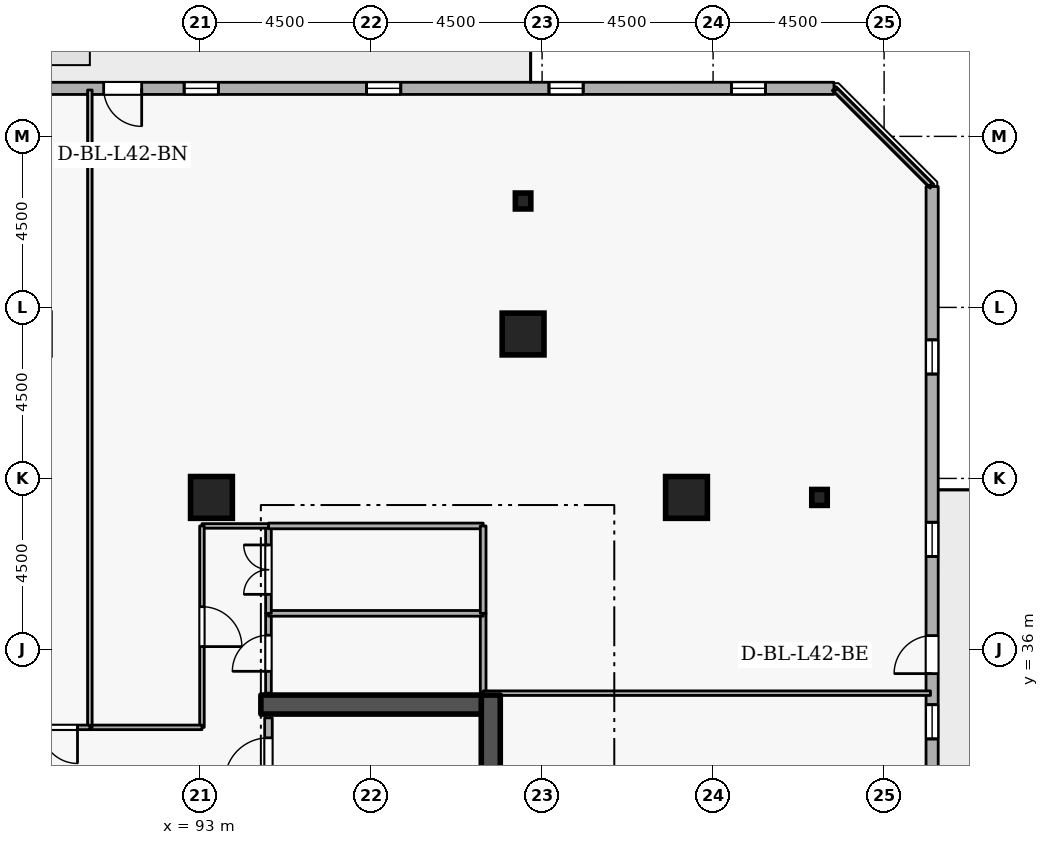
"""IFC4 building model, lengths in metres.
Left out: names, types, materials, properties, quantities, classifications, styles, units other than length and angle.
Written with IfcOpenShell. Run it as: python <this file> out.ifc"""

import sys

from ifc_helpers import new_model, si_unit, direction, frame, frame_2d, origin, origin_2d, place, context, subcontext, project, spatial, rectangle, i_section, extrude, element, fill, save


model = new_model("IFC4")
c1 = context("Model", 3, precision=1e-05, world=origin(), true_north=direction((0.0, 1.0)))
c2 = subcontext(c1, "Body", "Model", "MODEL_VIEW")
j1 = project(units=[si_unit("LENGTHUNIT", "METRE"), si_unit("PLANEANGLEUNIT", "RADIAN")], contexts=[c1])
p1 = place(None, origin())
s1 = spatial("IfcSite", under=j1, at=p1, CompositionType="ELEMENT")
p2 = place(p1, origin())
s2 = spatial("IfcBuilding", under=s1, at=p2, CompositionType="ELEMENT")
p3 = place(p2, frame((0.0, 0.0, 159.9)))
s3 = spatial("IfcBuildingStorey", under=s2, at=p3, CompositionType="ELEMENT", Elevation=159.9)
p4 = place(p3, frame((100.65, 19.2, 0.0), z_axis=(0.0, 0.0, 1.0), x_axis=(0.0, 1.0, 0.0)))
e1 = element("IfcWall", 1, at=p4, inside=s3, PredefinedType="SHEAR", context=c2, shape_type="SweptSolid", body=[
    extrude(rectangle(XDim=15.6, YDim=0.5, at=frame_2d((7.8, 0.0))), origin(), (0.0, 0.0, 1.0), 3.6),
])
p5 = place(p3, frame((94.6, 34.55, 0.0), z_axis=(0.0, 0.0, 1.0), x_axis=(1.0, 0.0, 0.0)))
e2 = element("IfcWall", 2, at=p5, inside=s3, PredefinedType="SHEAR", context=c2, shape_type="SweptSolid", body=[
    extrude(rectangle(XDim=5.8, YDim=0.5, at=frame_2d((2.9, 0.0))), origin(), (0.0, 0.0, 1.0), 3.6),
])
for number, where, z_axis, x_axis in (
    (3, (105.8, 40.0, 0.0), (0.0, 0.0, 1.0), (1.0, 0.0, 0.0)),
    (4, (101.5, 44.3, 0.0), (0.0, 0.0, 1.0), (1.0, 0.0, 0.0)),
    (5, (93.3, 40.0, 0.0), (0.0, 0.0, 1.0), (1.0, 0.0, 0.0)),
):
    element("IfcColumn", number, at=place(p3, frame(where, z_axis=z_axis, x_axis=x_axis)), inside=s3, PredefinedType="COLUMN", context=c2, shape_type="SweptSolid", body=[
        extrude(rectangle(XDim=1.1, YDim=1.1, at=origin_2d()), origin(), (0.0, 0.0, 1.0), 3.6),
    ])
for number, where, z_axis, x_axis in (
    (6, (109.3, 40.0, 0.0), (0.0, 0.0, 1.0), (1.0, 0.0, 0.0)),
    (7, (101.5, 47.8, 0.0), (0.0, 0.0, 1.0), (1.0, 0.0, 0.0)),
):
    element("IfcColumn", number, at=place(p3, frame(where, z_axis=z_axis, x_axis=x_axis)), inside=s3, PredefinedType="COLUMN", context=c2, shape_type="SweptSolid", body=[
        extrude(i_section(OverallWidth=0.407, OverallDepth=0.419, WebThickness=0.031, FlangeThickness=0.049, FilletRadius=0.015, at=origin_2d()), origin(), (0.0, 0.0, 1.0), 3.6),
    ])
p6 = place(p3, frame((112.262, 12.646, 0.0), z_axis=(0.0, 0.0, 1.0), x_axis=(7.5574884e-05, 0.999999997144, 0.0)))
e8 = element("IfcWall", 8, at=p6, inside=s3, PredefinedType="STANDARD", context=c2, shape_type="SweptSolid", body=[
    extrude(rectangle(XDim=35.535, YDim=0.32, at=frame_2d((17.768, 0.0))), origin(), (0.0, 0.0, 1.0), 2.7),
])
p7 = place(p6, frame((22.718, 0.0, 0.0)))
e9 = element("IfcOpeningElement", 9, at=p7, cuts=e8, PredefinedType="OPENING", context=c2, shape_type="SweptSolid", body=[
    extrude(rectangle(XDim=1.0, YDim=2.08, at=frame_2d((0.5, 1.04))), frame((0.0, 0.17, 0.0), z_axis=(0.0, -1.0, 0.0), x_axis=(1.0, 0.0, 0.0)), (0.0, 0.0, 1.0), 0.34),
])
p8 = place(p6, frame((1.8, 0.0, 0.72)))
e10 = element("IfcOpeningElement", 10, at=p8, cuts=e8, PredefinedType="OPENING", context=c2, shape_type="SweptSolid", body=[
    extrude(rectangle(XDim=0.9, YDim=1.75, at=frame_2d((0.45, 0.875))), frame((0.0, 0.17, 0.0), z_axis=(0.0, -1.0, 0.0), x_axis=(1.0, 0.0, 0.0)), (0.0, 0.0, 1.0), 0.34),
])
p9 = place(p6, frame((6.6, 0.0, 0.72)))
e11 = element("IfcOpeningElement", 11, at=p9, cuts=e8, PredefinedType="OPENING", context=c2, shape_type="SweptSolid", body=[
    extrude(rectangle(XDim=0.9, YDim=1.75, at=frame_2d((0.45, 0.875))), frame((0.0, 0.17, 0.0), z_axis=(0.0, -1.0, 0.0), x_axis=(1.0, 0.0, 0.0)), (0.0, 0.0, 1.0), 0.34),
])
p10 = place(p6, frame((11.4, 0.0, 0.72)))
e12 = element("IfcOpeningElement", 12, at=p10, cuts=e8, PredefinedType="OPENING", context=c2, shape_type="SweptSolid", body=[
    extrude(rectangle(XDim=0.9, YDim=1.75, at=frame_2d((0.45, 0.875))), frame((0.0, 0.17, 0.0), z_axis=(0.0, -1.0, 0.0), x_axis=(1.0, 0.0, 0.0)), (0.0, 0.0, 1.0), 0.34),
])
p11 = place(p6, frame((16.2, 0.0, 0.72)))
e13 = element("IfcOpeningElement", 13, at=p11, cuts=e8, PredefinedType="OPENING", context=c2, shape_type="SweptSolid", body=[
    extrude(rectangle(XDim=0.9, YDim=1.75, at=frame_2d((0.45, 0.875))), frame((0.0, 0.17, 0.0), z_axis=(0.0, -1.0, 0.0), x_axis=(1.0, 0.0, 0.0)), (0.0, 0.0, 1.0), 0.34),
])
p12 = place(p6, frame((21.0, 0.0, 0.72)))
e14 = element("IfcOpeningElement", 14, at=p12, cuts=e8, PredefinedType="OPENING", context=c2, shape_type="SweptSolid", body=[
    extrude(rectangle(XDim=0.9, YDim=1.75, at=frame_2d((0.45, 0.875))), frame((0.0, 0.17, 0.0), z_axis=(0.0, -1.0, 0.0), x_axis=(1.0, 0.0, 0.0)), (0.0, 0.0, 1.0), 0.34),
])
p13 = place(p6, frame((25.8, 0.0, 0.72)))
e15 = element("IfcOpeningElement", 15, at=p13, cuts=e8, PredefinedType="OPENING", context=c2, shape_type="SweptSolid", body=[
    extrude(rectangle(XDim=0.9, YDim=1.75, at=frame_2d((0.45, 0.875))), frame((0.0, 0.17, 0.0), z_axis=(0.0, -1.0, 0.0), x_axis=(1.0, 0.0, 0.0)), (0.0, 0.0, 1.0), 0.34),
])
p14 = place(p6, frame((30.6, 0.0, 0.72)))
e16 = element("IfcOpeningElement", 16, at=p14, cuts=e8, PredefinedType="OPENING", context=c2, shape_type="SweptSolid", body=[
    extrude(rectangle(XDim=0.9, YDim=1.75, at=frame_2d((0.45, 0.875))), frame((0.0, 0.17, 0.0), z_axis=(0.0, -1.0, 0.0), x_axis=(1.0, 0.0, 0.0)), (0.0, 0.0, 1.0), 0.34),
])
p15 = place(p3, frame((109.681, 50.765, 0.0), z_axis=(0.0, 0.0, 1.0), x_axis=(-0.999999997144, -7.5574884e-05, 0.0)))
e17 = element("IfcWall", 17, at=p15, inside=s3, PredefinedType="STANDARD", context=c2, shape_type="SweptSolid", body=[
    extrude(rectangle(XDim=35.535, YDim=0.32, at=frame_2d((17.768, 0.0))), origin(), (0.0, 0.0, 1.0), 2.7),
])
p16 = place(p15, frame((18.218, 0.0, 0.0)))
e18 = element("IfcOpeningElement", 18, at=p16, cuts=e17, PredefinedType="OPENING", context=c2, shape_type="SweptSolid", body=[
    extrude(rectangle(XDim=1.0, YDim=2.08, at=frame_2d((0.5, 1.04))), frame((0.0, 0.17, 0.0), z_axis=(0.0, -1.0, 0.0), x_axis=(1.0, 0.0, 0.0)), (0.0, 0.0, 1.0), 0.34),
])
p17 = place(p15, frame((1.8, 0.0, 0.72)))
e19 = element("IfcOpeningElement", 19, at=p17, cuts=e17, PredefinedType="OPENING", context=c2, shape_type="SweptSolid", body=[
    extrude(rectangle(XDim=0.9, YDim=1.75, at=frame_2d((0.45, 0.875))), frame((0.0, 0.17, 0.0), z_axis=(0.0, -1.0, 0.0), x_axis=(1.0, 0.0, 0.0)), (0.0, 0.0, 1.0), 0.34),
])
p18 = place(p15, frame((6.6, 0.0, 0.72)))
e20 = element("IfcOpeningElement", 20, at=p18, cuts=e17, PredefinedType="OPENING", context=c2, shape_type="SweptSolid", body=[
    extrude(rectangle(XDim=0.9, YDim=1.75, at=frame_2d((0.45, 0.875))), frame((0.0, 0.17, 0.0), z_axis=(0.0, -1.0, 0.0), x_axis=(1.0, 0.0, 0.0)), (0.0, 0.0, 1.0), 0.34),
])
p19 = place(p15, frame((11.4, 0.0, 0.72)))
e21 = element("IfcOpeningElement", 21, at=p19, cuts=e17, PredefinedType="OPENING", context=c2, shape_type="SweptSolid", body=[
    extrude(rectangle(XDim=0.9, YDim=1.75, at=frame_2d((0.45, 0.875))), frame((0.0, 0.17, 0.0), z_axis=(0.0, -1.0, 0.0), x_axis=(1.0, 0.0, 0.0)), (0.0, 0.0, 1.0), 0.34),
])
p20 = place(p15, frame((16.2, 0.0, 0.72)))
e22 = element("IfcOpeningElement", 22, at=p20, cuts=e17, PredefinedType="OPENING", context=c2, shape_type="SweptSolid", body=[
    extrude(rectangle(XDim=0.9, YDim=1.75, at=frame_2d((0.45, 0.875))), frame((0.0, 0.17, 0.0), z_axis=(0.0, -1.0, 0.0), x_axis=(1.0, 0.0, 0.0)), (0.0, 0.0, 1.0), 0.34),
])
p21 = place(p15, frame((25.8, 0.0, 0.72)))
e23 = element("IfcOpeningElement", 23, at=p21, cuts=e17, PredefinedType="OPENING", context=c2, shape_type="SweptSolid", body=[
    extrude(rectangle(XDim=0.9, YDim=1.75, at=frame_2d((0.45, 0.875))), frame((0.0, 0.17, 0.0), z_axis=(0.0, -1.0, 0.0), x_axis=(1.0, 0.0, 0.0)), (0.0, 0.0, 1.0), 0.34),
])
p22 = place(p15, frame((30.6, 0.0, 0.72)))
e24 = element("IfcOpeningElement", 24, at=p22, cuts=e17, PredefinedType="OPENING", context=c2, shape_type="SweptSolid", body=[
    extrude(rectangle(XDim=0.9, YDim=1.75, at=frame_2d((0.45, 0.875))), frame((0.0, 0.17, 0.0), z_axis=(0.0, -1.0, 0.0), x_axis=(1.0, 0.0, 0.0)), (0.0, 0.0, 1.0), 0.34),
])
p23 = place(p3, frame((94.8, 32.0, 0.0), z_axis=(0.0, 0.0, 1.0), x_axis=(0.0, 1.0, 0.0)))
e25 = element("IfcWall", 25, at=p23, inside=s3, PredefinedType="STANDARD", context=c2, shape_type="SweptSolid", body=[
    extrude(rectangle(XDim=2.2, YDim=0.2, at=frame_2d((1.1, 0.0))), origin(), (0.0, 0.0, 1.0), 3.34),
])
p24 = place(p23, frame((0.525, 0.0, 0.0)))
e26 = element("IfcOpeningElement", 26, at=p24, cuts=e25, PredefinedType="OPENING", context=c2, shape_type="SweptSolid", body=[
    extrude(rectangle(XDim=1.15, YDim=2.1, at=frame_2d((0.575, 1.05))), frame((0.0, 0.11, 0.0), z_axis=(0.0, -1.0, 0.0), x_axis=(1.0, 0.0, 0.0)), (0.0, 0.0, 1.0), 0.22),
])
p25 = place(p3, frame((100.45, 36.95, 0.0), z_axis=(0.0, 0.0, 1.0), x_axis=(0.0, -1.0, 0.0)))
e27 = element("IfcWall", 27, at=p25, inside=s3, PredefinedType="PARTITIONING", context=c2, shape_type="SweptSolid", body=[
    extrude(rectangle(XDim=2.1, YDim=0.15, at=frame_2d((1.05, 0.0))), origin(), (0.0, 0.0, 1.0), 3.34),
])
p26 = place(p3, frame((94.8, 34.85, 0.0), z_axis=(0.0, 0.0, 1.0), x_axis=(0.0, 1.0, 0.0)))
e28 = element("IfcWall", 28, at=p26, inside=s3, PredefinedType="PARTITIONING", context=c2, shape_type="SweptSolid", body=[
    extrude(rectangle(XDim=2.1, YDim=0.15, at=frame_2d((1.05, 0.0))), origin(), (0.0, 0.0, 1.0), 3.34),
])
p27 = place(p26, frame((0.575, 0.0, 0.0)))
e29 = element("IfcOpeningElement", 29, at=p27, cuts=e28, PredefinedType="OPENING", context=c2, shape_type="SweptSolid", body=[
    extrude(rectangle(XDim=0.95, YDim=2.1, at=frame_2d((0.475, 1.05))), frame((0.0, 0.085, 0.0), z_axis=(0.0, -1.0, 0.0), x_axis=(1.0, 0.0, 0.0)), (0.0, 0.0, 1.0), 0.17),
])
p28 = place(p3, frame((94.8, 36.95, 0.0), z_axis=(0.0, 0.0, 1.0), x_axis=(1.0, 0.0, 0.0)))
e30 = element("IfcWall", 30, at=p28, inside=s3, PredefinedType="PARTITIONING", context=c2, shape_type="SweptSolid", body=[
    extrude(rectangle(XDim=5.65, YDim=0.15, at=frame_2d((2.825, 0.0))), origin(), (0.0, 0.0, 1.0), 3.34),
])
p29 = place(p3, frame((94.8, 36.95, 0.0), z_axis=(0.0, 0.0, 1.0), x_axis=(0.0, 1.0, 0.0)))
e31 = element("IfcWall", 31, at=p29, inside=s3, PredefinedType="PARTITIONING", context=c2, shape_type="SweptSolid", body=[
    extrude(rectangle(XDim=2.3, YDim=0.15, at=frame_2d((1.15, 0.0))), origin(), (0.0, 0.0, 1.0), 3.34),
])
p30 = place(p29, frame((0.5, 0.0, 0.0)))
e32 = element("IfcOpeningElement", 32, at=p30, cuts=e31, PredefinedType="OPENING", context=c2, shape_type="SweptSolid", body=[
    extrude(rectangle(XDim=1.3, YDim=2.12, at=frame_2d((0.65, 1.06))), frame((0.0, 0.085, 0.0), z_axis=(0.0, -1.0, 0.0), x_axis=(1.0, 0.0, 0.0)), (0.0, 0.0, 1.0), 0.17),
])
p31 = place(p3, frame((94.8, 39.25, 0.0), z_axis=(0.0, 0.0, 1.0), x_axis=(1.0, 0.0, 0.0)))
e33 = element("IfcWall", 33, at=p31, inside=s3, PredefinedType="PARTITIONING", context=c2, shape_type="SweptSolid", body=[
    extrude(rectangle(XDim=5.65, YDim=0.15, at=frame_2d((2.825, 0.0))), origin(), (0.0, 0.0, 1.0), 3.34),
])
p32 = place(p3, frame((100.45, 39.25, 0.0), z_axis=(0.0, 0.0, 1.0), x_axis=(0.0, -1.0, 0.0)))
e34 = element("IfcWall", 34, at=p32, inside=s3, PredefinedType="PARTITIONING", context=c2, shape_type="SweptSolid", body=[
    extrude(rectangle(XDim=2.3, YDim=0.15, at=frame_2d((1.15, 0.0))), origin(), (0.0, 0.0, 1.0), 3.34),
])
p33 = place(p3, frame((94.8, 39.25, 0.0), z_axis=(0.0, 0.0, 1.0), x_axis=(-1.0, 0.0, 0.0)))
e35 = element("IfcWall", 35, at=p33, inside=s3, PredefinedType="PARTITIONING", context=c2, shape_type="SweptSolid", body=[
    extrude(rectangle(XDim=1.75, YDim=0.12, at=frame_2d((0.875, 0.0))), origin(), (0.0, 0.0, 1.0), 3.34),
])
p34 = place(p3, frame((93.05, 39.25, 0.0), z_axis=(0.0, 0.0, 1.0), x_axis=(0.0, -1.0, 0.0)))
e36 = element("IfcWall", 36, at=p34, inside=s3, PredefinedType="PARTITIONING", context=c2, shape_type="SweptSolid", body=[
    extrude(rectangle(XDim=5.3, YDim=0.12, at=frame_2d((2.65, 0.0))), origin(), (0.0, 0.0, 1.0), 3.34),
])
p35 = place(p34, frame((2.125, 0.0, 0.0)))
e37 = element("IfcOpeningElement", 37, at=p35, cuts=e36, PredefinedType="OPENING", context=c2, shape_type="SweptSolid", body=[
    extrude(rectangle(XDim=1.05, YDim=2.1, at=frame_2d((0.525, 1.05))), frame((0.0, 0.07, 0.0), z_axis=(0.0, -1.0, 0.0), x_axis=(1.0, 0.0, 0.0)), (0.0, 0.0, 1.0), 0.14),
])
p36 = place(p3, frame((93.05, 33.95, 0.0), z_axis=(0.0, 0.0, 1.0), x_axis=(-1.0, 0.0, 0.0)))
e38 = element("IfcWall", 38, at=p36, inside=s3, PredefinedType="PARTITIONING", context=c2, shape_type="SweptSolid", body=[
    extrude(rectangle(XDim=2.95, YDim=0.12, at=frame_2d((1.475, 0.0))), origin(), (0.0, 0.0, 1.0), 3.34),
])
p37 = place(p3, frame((90.1, 33.95, 0.0), z_axis=(0.0, 0.0, 1.0), x_axis=(0.0, 1.0, 0.0)))
e39 = element("IfcWall", 39, at=p37, inside=s3, PredefinedType="PARTITIONING", context=c2, shape_type="SweptSolid", body=[
    extrude(rectangle(XDim=16.77, YDim=0.12, at=frame_2d((8.385, 0.0))), origin(), (0.0, 0.0, 1.0), 3.34),
])
p38 = place(p3, frame((109.725, 50.72, 0.0), z_axis=(0.0, 0.0, 1.0), x_axis=(0.707106781187, -0.707106781187, 0.0)))
e40 = element("IfcWall", 40, at=p38, inside=s3, PredefinedType="PARTITIONING", context=c2, shape_type="SweptSolid", body=[
    extrude(rectangle(XDim=3.528, YDim=0.12, at=frame_2d((1.764, 0.0))), origin(), (0.0, 0.0, 1.0), 3.34),
])
p39 = place(p3, frame((112.22, 34.85, 0.0), z_axis=(0.0, 0.0, 1.0), x_axis=(-1.0, 0.0, 0.0)))
e41 = element("IfcWall", 41, at=p39, inside=s3, PredefinedType="PARTITIONING", context=c2, shape_type="SweptSolid", body=[
    extrude(rectangle(XDim=11.77, YDim=0.12, at=frame_2d((5.885, 0.0))), origin(), (0.0, 0.0, 1.0), 2.545),
])
p40 = place(p3, frame((90.1, 33.95, 0.0), z_axis=(0.0, 0.0, 1.0), x_axis=(-1.0, 0.0, 0.0)))
e42 = element("IfcWall", 42, at=p40, inside=s3, PredefinedType="PARTITIONING", context=c2, shape_type="SweptSolid", body=[
    extrude(rectangle(XDim=1.6, YDim=0.12, at=frame_2d((0.8, 0.0))), origin(), (0.0, 0.0, 1.0), 3.34),
])
p41 = place(p40, frame((0.325, 0.0, 0.0)))
e43 = element("IfcOpeningElement", 43, at=p41, cuts=e42, PredefinedType="OPENING", context=c2, shape_type="SweptSolid", body=[
    extrude(rectangle(XDim=0.95, YDim=2.1, at=frame_2d((0.475, 1.05))), frame((0.0, 0.07, 0.0), z_axis=(0.0, -1.0, 0.0), x_axis=(1.0, 0.0, 0.0)), (0.0, 0.0, 1.0), 0.14),
])
p42 = place(p7, origin())
e44 = element("IfcDoor", 44, at=p42, inside=s3, OperationType="SINGLE_SWING_LEFT", PredefinedType="DOOR", context=c2, shape_type="SweptSolid", body=[
    extrude(rectangle(XDim=1.0, YDim=2.08, at=frame_2d((0.5, 1.04))), frame((0.0, 0.025, 0.0), z_axis=(0.0, -1.0, 0.0), x_axis=(1.0, 0.0, 0.0)), (0.0, 0.0, 1.0), 0.05),
])
fill(e9, e44)
p43 = place(p12, origin())
e45 = element("IfcWindow", 45, at=p43, inside=s3, PartitioningType="SINGLE_PANEL", PredefinedType="WINDOW", context=c2, shape_type="SweptSolid", body=[
    extrude(rectangle(XDim=0.9, YDim=1.75, at=frame_2d((0.45, 0.875))), frame((0.0, 0.03, 0.0), z_axis=(0.0, -1.0, 0.0), x_axis=(1.0, 0.0, 0.0)), (0.0, 0.0, 1.0), 0.06),
])
fill(e14, e45)
p44 = place(p13, origin())
e46 = element("IfcWindow", 46, at=p44, inside=s3, PartitioningType="SINGLE_PANEL", PredefinedType="WINDOW", context=c2, shape_type="SweptSolid", body=[
    extrude(rectangle(XDim=0.9, YDim=1.75, at=frame_2d((0.45, 0.875))), frame((0.0, 0.03, 0.0), z_axis=(0.0, -1.0, 0.0), x_axis=(1.0, 0.0, 0.0)), (0.0, 0.0, 1.0), 0.06),
])
fill(e15, e46)
p45 = place(p14, origin())
e47 = element("IfcWindow", 47, at=p45, inside=s3, PartitioningType="SINGLE_PANEL", PredefinedType="WINDOW", context=c2, shape_type="SweptSolid", body=[
    extrude(rectangle(XDim=0.9, YDim=1.75, at=frame_2d((0.45, 0.875))), frame((0.0, 0.03, 0.0), z_axis=(0.0, -1.0, 0.0), x_axis=(1.0, 0.0, 0.0)), (0.0, 0.0, 1.0), 0.06),
])
fill(e16, e47)
p46 = place(p16, origin())
e48 = element("IfcDoor", 48, at=p46, inside=s3, OperationType="SINGLE_SWING_LEFT", PredefinedType="DOOR", context=c2, shape_type="SweptSolid", body=[
    extrude(rectangle(XDim=1.0, YDim=2.08, at=frame_2d((0.5, 1.04))), frame((0.0, 0.025, 0.0), z_axis=(0.0, -1.0, 0.0), x_axis=(1.0, 0.0, 0.0)), (0.0, 0.0, 1.0), 0.05),
])
fill(e18, e48)
p47 = place(p17, origin())
e49 = element("IfcWindow", 49, at=p47, inside=s3, PartitioningType="SINGLE_PANEL", PredefinedType="WINDOW", context=c2, shape_type="SweptSolid", body=[
    extrude(rectangle(XDim=0.9, YDim=1.75, at=frame_2d((0.45, 0.875))), frame((0.0, 0.03, 0.0), z_axis=(0.0, -1.0, 0.0), x_axis=(1.0, 0.0, 0.0)), (0.0, 0.0, 1.0), 0.06),
])
fill(e19, e49)
p48 = place(p18, origin())
e50 = element("IfcWindow", 50, at=p48, inside=s3, PartitioningType="SINGLE_PANEL", PredefinedType="WINDOW", context=c2, shape_type="SweptSolid", body=[
    extrude(rectangle(XDim=0.9, YDim=1.75, at=frame_2d((0.45, 0.875))), frame((0.0, 0.03, 0.0), z_axis=(0.0, -1.0, 0.0), x_axis=(1.0, 0.0, 0.0)), (0.0, 0.0, 1.0), 0.06),
])
fill(e20, e50)
p49 = place(p19, origin())
e51 = element("IfcWindow", 51, at=p49, inside=s3, PartitioningType="SINGLE_PANEL", PredefinedType="WINDOW", context=c2, shape_type="SweptSolid", body=[
    extrude(rectangle(XDim=0.9, YDim=1.75, at=frame_2d((0.45, 0.875))), frame((0.0, 0.03, 0.0), z_axis=(0.0, -1.0, 0.0), x_axis=(1.0, 0.0, 0.0)), (0.0, 0.0, 1.0), 0.06),
])
fill(e21, e51)
p50 = place(p20, origin())
e52 = element("IfcWindow", 52, at=p50, inside=s3, PartitioningType="SINGLE_PANEL", PredefinedType="WINDOW", context=c2, shape_type="SweptSolid", body=[
    extrude(rectangle(XDim=0.9, YDim=1.75, at=frame_2d((0.45, 0.875))), frame((0.0, 0.03, 0.0), z_axis=(0.0, -1.0, 0.0), x_axis=(1.0, 0.0, 0.0)), (0.0, 0.0, 1.0), 0.06),
])
fill(e22, e52)
p51 = place(p24, origin())
e53 = element("IfcDoor", 53, at=p51, inside=s3, OperationType="SINGLE_SWING_LEFT", PredefinedType="DOOR", context=c2, shape_type="SweptSolid", body=[
    extrude(rectangle(XDim=1.15, YDim=2.1, at=frame_2d((0.575, 1.05))), frame((0.0, 0.025, 0.0), z_axis=(0.0, -1.0, 0.0), x_axis=(1.0, 0.0, 0.0)), (0.0, 0.0, 1.0), 0.05),
])
fill(e26, e53)
p52 = place(p27, origin())
e54 = element("IfcDoor", 54, at=p52, inside=s3, OperationType="SINGLE_SWING_LEFT", PredefinedType="DOOR", context=c2, shape_type="SweptSolid", body=[
    extrude(rectangle(XDim=0.95, YDim=2.1, at=frame_2d((0.475, 1.05))), frame((0.0, 0.025, 0.0), z_axis=(0.0, -1.0, 0.0), x_axis=(1.0, 0.0, 0.0)), (0.0, 0.0, 1.0), 0.05),
])
fill(e29, e54)
p53 = place(p30, origin())
e55 = element("IfcDoor", 55, at=p53, inside=s3, OperationType="DOUBLE_DOOR_SINGLE_SWING", PredefinedType="DOOR", context=c2, shape_type="SweptSolid", body=[
    extrude(rectangle(XDim=1.3, YDim=2.12, at=frame_2d((0.65, 1.06))), frame((0.0, 0.025, 0.0), z_axis=(0.0, -1.0, 0.0), x_axis=(1.0, 0.0, 0.0)), (0.0, 0.0, 1.0), 0.05),
])
fill(e32, e55)
p54 = place(p35, origin())
e56 = element("IfcDoor", 56, at=p54, inside=s3, OperationType="SINGLE_SWING_RIGHT", PredefinedType="DOOR", context=c2, shape_type="SweptSolid", body=[
    extrude(rectangle(XDim=1.05, YDim=2.1, at=frame_2d((0.525, 1.05))), frame((0.0, 0.025, 0.0), z_axis=(0.0, -1.0, 0.0), x_axis=(1.0, 0.0, 0.0)), (0.0, 0.0, 1.0), 0.05),
])
fill(e37, e56)
p55 = place(p41, origin())
e57 = element("IfcDoor", 57, at=p55, inside=s3, OperationType="SINGLE_SWING_LEFT", PredefinedType="DOOR", context=c2, shape_type="SweptSolid", body=[
    extrude(rectangle(XDim=0.95, YDim=2.1, at=frame_2d((0.475, 1.05))), frame((0.0, 0.025, 0.0), z_axis=(0.0, -1.0, 0.0), x_axis=(1.0, 0.0, 0.0)), (0.0, 0.0, 1.0), 0.05),
])
fill(e43, e57)
save(model, sys.argv[1])
